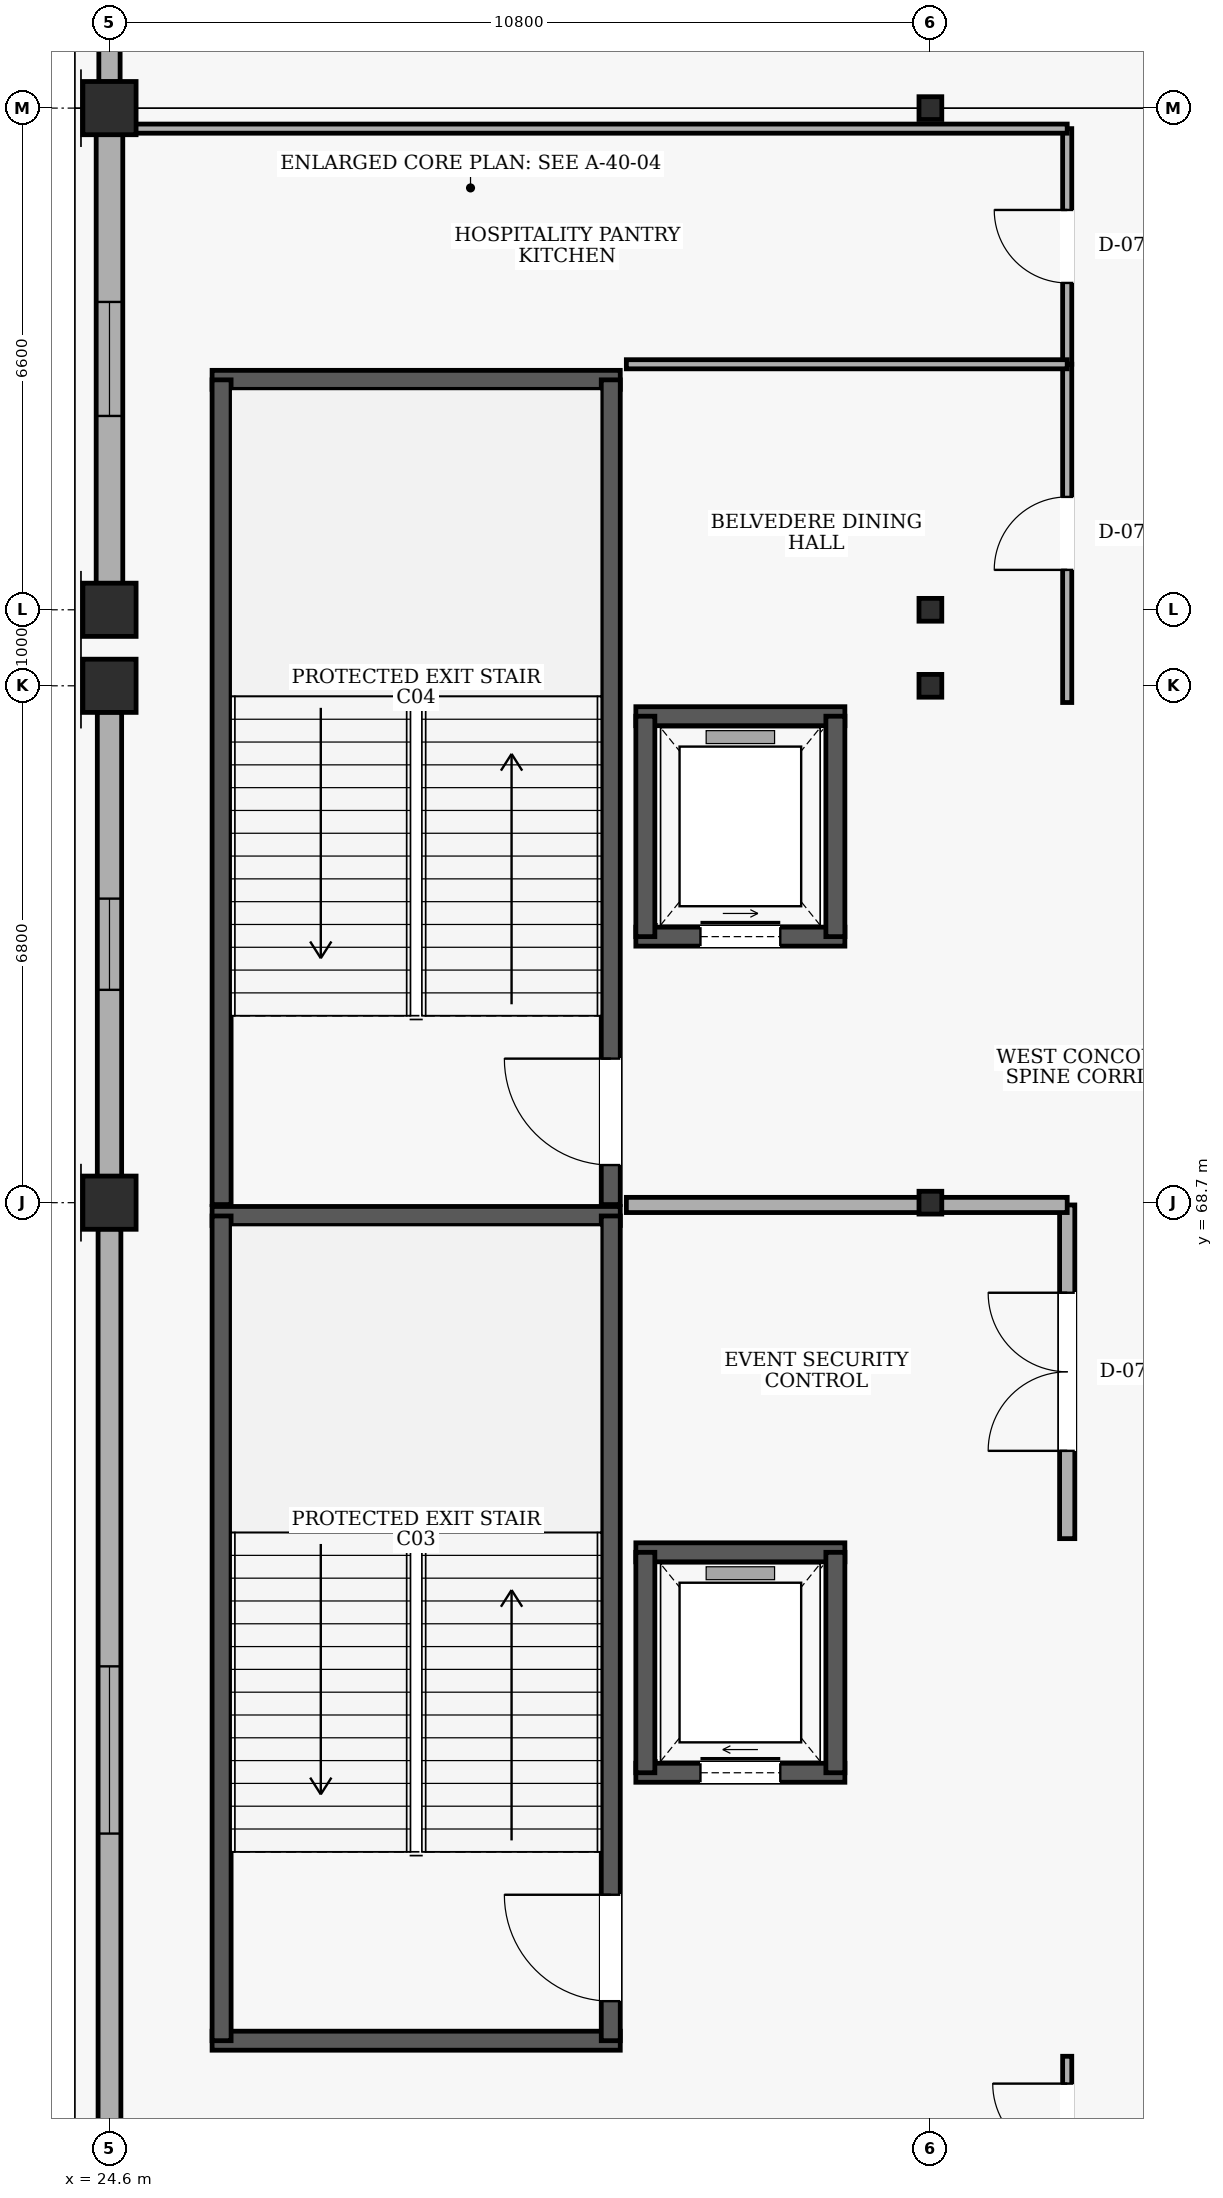
"""IFC4 building model, lengths in metres.
Left out: names, types, materials, properties, quantities, classifications, styles, units other than length and angle.
Written with IfcOpenShell. Run it as: python <this file> out.ifc"""

import sys

from ifc_helpers import new_model, si_unit, direction, frame, frame_2d, origin, origin_2d, place, context, subcontext, project, spatial, rectangle, hollow_rectangle, extrude, element, fill, save


model = new_model("IFC4")
c1 = context("Model", 3, precision=1e-05, world=origin(), true_north=direction((0.0, 1.0)))
c2 = subcontext(c1, "Body", "Model", "MODEL_VIEW")
j1 = project(units=[si_unit("LENGTHUNIT", "METRE"), si_unit("PLANEANGLEUNIT", "RADIAN")], contexts=[c1])
p1 = place(None, origin())
s1 = spatial("IfcSite", under=j1, at=p1, CompositionType="ELEMENT")
p2 = place(p1, origin())
s2 = spatial("IfcBuilding", under=s1, at=p2, CompositionType="ELEMENT")
p3 = place(p2, frame((0.0, 0.0, 24.6)))
s3 = spatial("IfcBuildingStorey", under=s2, at=p3, CompositionType="ELEMENT", Elevation=24.6)
for number, where, z_axis, x_axis in (
    (1, (24.6, 68.7, 0.0), (0.0, 0.0, 1.0), (1.0, 0.0, 0.0)),
    (2, (24.6, 75.5, 0.0), (0.0, 0.0, 1.0), (1.0, 0.0, 0.0)),
    (3, (24.6, 76.5, 0.0), (0.0, 0.0, 1.0), (1.0, 0.0, 0.0)),
    (4, (24.6, 83.1, 0.0), (0.0, 0.0, 1.0), (1.0, 0.0, 0.0)),
):
    element("IfcColumn", number, at=place(p3, frame(where, z_axis=z_axis, x_axis=x_axis)), inside=s3, PredefinedType="COLUMN", context=c2, shape_type="SweptSolid", body=[
        extrude(rectangle(XDim=0.7, YDim=0.7, at=origin_2d()), origin(), (0.0, 0.0, 1.0), 4.8),
    ])
for number, where, z_axis, x_axis in (
    (5, (35.4, 68.7, 0.0), (0.0, 0.0, 1.0), (1.0, 0.0, 0.0)),
    (6, (35.4, 75.5, 0.0), (0.0, 0.0, 1.0), (1.0, 0.0, 0.0)),
    (7, (35.4, 76.5, 0.0), (0.0, 0.0, 1.0), (1.0, 0.0, 0.0)),
    (8, (35.4, 83.1, 0.0), (0.0, 0.0, 1.0), (1.0, 0.0, 0.0)),
):
    element("IfcColumn", number, at=place(p3, frame(where, z_axis=z_axis, x_axis=x_axis)), inside=s3, PredefinedType="COLUMN", context=c2, shape_type="SweptSolid", body=[
        extrude(hollow_rectangle(XDim=0.3, YDim=0.3, WallThickness=0.016, at=origin_2d()), origin(), (0.0, 0.0, 1.0), 4.8),
    ])
p4 = place(p3, frame((24.6, 54.645, 0.0), z_axis=(0.0, 0.0, 1.0), x_axis=(0.0, 1.0, 0.0)))
e9 = element("IfcWall", 9, at=p4, inside=s3, PredefinedType="SOLIDWALL", context=c2, shape_type="SweptSolid", body=[
    extrude(rectangle(XDim=13.71, YDim=0.3, at=frame_2d((6.855, 0.0))), origin(), (0.0, 0.0, 1.0), 3.58),
])
p5 = place(p4, frame((5.755, 0.0, 0.9)))
e10 = element("IfcOpeningElement", 10, at=p5, cuts=e9, PredefinedType="OPENING", context=c2, shape_type="SweptSolid", body=[
    extrude(rectangle(XDim=2.2, YDim=1.5, at=frame_2d((1.1, 0.75))), frame((0.0, 0.16, 0.0), z_axis=(0.0, -1.0, 0.0), x_axis=(1.0, 0.0, 0.0)), (0.0, 0.0, 1.0), 0.32),
])
p6 = place(p3, frame((24.6, 69.045, 0.0), z_axis=(0.0, 0.0, 1.0), x_axis=(0.0, 1.0, 0.0)))
e11 = element("IfcWall", 11, at=p6, inside=s3, PredefinedType="SOLIDWALL", context=c2, shape_type="SweptSolid", body=[
    extrude(rectangle(XDim=6.11, YDim=0.32, at=frame_2d((3.055, 0.0))), origin(), (0.0, 0.0, 1.0), 3.88),
])
p7 = place(p6, frame((2.455, 0.0, 0.9)))
e12 = element("IfcOpeningElement", 12, at=p7, cuts=e11, PredefinedType="OPENING", context=c2, shape_type="SweptSolid", body=[
    extrude(rectangle(XDim=1.2, YDim=1.8, at=frame_2d((0.6, 0.9))), frame((0.0, 0.17, 0.0), z_axis=(0.0, -1.0, 0.0), x_axis=(1.0, 0.0, 0.0)), (0.0, 0.0, 1.0), 0.34),
])
p8 = place(p3, frame((24.6, 76.845, 0.0), z_axis=(0.0, 0.0, 1.0), x_axis=(0.0, 1.0, 0.0)))
e13 = element("IfcWall", 13, at=p8, inside=s3, PredefinedType="SOLIDWALL", context=c2, shape_type="SweptSolid", body=[
    extrude(rectangle(XDim=5.91, YDim=0.35, at=frame_2d((2.955, 0.0))), origin(), (0.0, 0.0, 1.0), 3.98),
])
p9 = place(p8, frame((2.205, 0.0, 0.9)))
e14 = element("IfcOpeningElement", 14, at=p9, cuts=e13, PredefinedType="OPENING", context=c2, shape_type="SweptSolid", body=[
    extrude(rectangle(XDim=1.5, YDim=1.8, at=frame_2d((0.75, 0.9))), frame((0.0, 0.185, 0.0), z_axis=(0.0, -1.0, 0.0), x_axis=(1.0, 0.0, 0.0)), (0.0, 0.0, 1.0), 0.37),
])
p10 = place(p3, frame((24.6, 83.445, 0.0), z_axis=(0.0, 0.0, 1.0), x_axis=(0.0, 1.0, 0.0)))
e15 = element("IfcWall", 15, at=p10, inside=s3, PredefinedType="SOLIDWALL", context=c2, shape_type="SweptSolid", body=[
    extrude(rectangle(XDim=13.71, YDim=0.28, at=frame_2d((6.855, 0.0))), origin(), (0.0, 0.0, 1.0), 3.58),
])
p11 = place(p10, frame((5.955, 0.0, 0.9)))
e16 = element("IfcOpeningElement", 16, at=p11, cuts=e15, PredefinedType="OPENING", context=c2, shape_type="SweptSolid", body=[
    extrude(rectangle(XDim=1.8, YDim=1.8, at=frame_2d((0.9, 0.9))), frame((0.0, 0.15, 0.0), z_axis=(0.0, -1.0, 0.0), x_axis=(1.0, 0.0, 0.0)), (0.0, 0.0, 1.0), 0.3),
])
for number, where, z_axis, x_axis in (
    (17, (25.95, 57.675, 0.0), (0.0, 0.0, 1.0), (1.0, 0.0, 0.0)),
    (18, (31.32, 68.525, 0.0), (0.0, 0.0, 1.0), (-1.0, 0.0, 0.0)),
):
    element("IfcWall", number, at=place(p3, frame(where, z_axis=z_axis, x_axis=x_axis)), inside=s3, PredefinedType="SHEAR", context=c2, shape_type="SweptSolid", body=[
        extrude(rectangle(XDim=5.37, YDim=0.25, at=frame_2d((2.685, 0.0))), origin(), (0.0, 0.0, 1.0), 4.5),
    ])
p12 = place(p3, frame((26.075, 57.675, 0.0), z_axis=(0.0, 0.0, 1.0), x_axis=(0.0, 1.0, 0.0)))
e19 = element("IfcWall", 19, at=p12, inside=s3, PredefinedType="SHEAR", context=c2, shape_type="SweptSolid", body=[
    extrude(rectangle(XDim=10.85, YDim=0.25, at=frame_2d((5.425, 0.0))), origin(), (0.0, 0.0, 1.0), 4.5),
])
p13 = place(p3, frame((31.195, 57.675, 0.0), z_axis=(0.0, 0.0, 1.0), x_axis=(0.0, 1.0, 0.0)))
e20 = element("IfcWall", 20, at=p13, inside=s3, PredefinedType="SHEAR", context=c2, shape_type="SweptSolid", body=[
    extrude(rectangle(XDim=10.85, YDim=0.25, at=frame_2d((5.425, 0.0))), origin(), (0.0, 0.0, 1.0), 4.5),
])
p14 = place(p13, frame((0.52, 0.0, 0.0)))
e21 = element("IfcOpeningElement", 21, at=p14, cuts=e20, PredefinedType="OPENING", context=c2, shape_type="SweptSolid", body=[
    extrude(rectangle(XDim=1.4, YDim=2.15, at=frame_2d((0.7, 1.075))), frame((0.0, 0.135, 0.0), z_axis=(0.0, -1.0, 0.0), x_axis=(1.0, 0.0, 0.0)), (0.0, 0.0, 1.0), 0.27),
])
p15 = place(p3, frame((31.32, 79.525, 0.0), z_axis=(0.0, 0.0, 1.0), x_axis=(-1.0, 0.0, 0.0)))
e22 = element("IfcWall", 22, at=p15, inside=s3, PredefinedType="SHEAR", context=c2, shape_type="SweptSolid", body=[
    extrude(rectangle(XDim=5.37, YDim=0.25, at=frame_2d((2.685, 0.0))), origin(), (0.0, 0.0, 1.0), 4.5),
])
p16 = place(p3, frame((26.075, 68.675, 0.0), z_axis=(0.0, 0.0, 1.0), x_axis=(0.0, 1.0, 0.0)))
e23 = element("IfcWall", 23, at=p16, inside=s3, PredefinedType="SHEAR", context=c2, shape_type="SweptSolid", body=[
    extrude(rectangle(XDim=10.85, YDim=0.25, at=frame_2d((5.425, 0.0))), origin(), (0.0, 0.0, 1.0), 4.5),
])
p17 = place(p3, frame((31.195, 68.675, 0.0), z_axis=(0.0, 0.0, 1.0), x_axis=(0.0, 1.0, 0.0)))
e24 = element("IfcWall", 24, at=p17, inside=s3, PredefinedType="SHEAR", context=c2, shape_type="SweptSolid", body=[
    extrude(rectangle(XDim=10.85, YDim=0.25, at=frame_2d((5.425, 0.0))), origin(), (0.0, 0.0, 1.0), 4.5),
])
p18 = place(p17, frame((0.52, 0.0, 0.0)))
e25 = element("IfcOpeningElement", 25, at=p18, cuts=e24, PredefinedType="OPENING", context=c2, shape_type="SweptSolid", body=[
    extrude(rectangle(XDim=1.4, YDim=2.15, at=frame_2d((0.7, 1.075))), frame((0.0, 0.135, 0.0), z_axis=(0.0, -1.0, 0.0), x_axis=(1.0, 0.0, 0.0)), (0.0, 0.0, 1.0), 0.27),
])
p19 = place(p3, frame((31.525, 61.2, 0.0), z_axis=(0.0, 0.0, 1.0), x_axis=(1.0, 0.0, 0.0)))
e26 = element("IfcWall", 26, at=p19, inside=s3, PredefinedType="SHEAR", context=c2, shape_type="SweptSolid", body=[
    extrude(rectangle(XDim=2.75, YDim=0.25, at=frame_2d((1.375, 0.0))), origin(), (0.0, 0.0, 1.0), 4.5),
])
p20 = place(p19, frame((0.85, 0.0, 0.0)))
e27 = element("IfcOpeningElement", 27, at=p20, cuts=e26, PredefinedType="OPENING", context=c2, shape_type="SweptSolid", body=[
    extrude(rectangle(XDim=1.05, YDim=2.15, at=frame_2d((0.525, 1.075))), frame((0.0, 0.135, 0.0), z_axis=(0.0, -1.0, 0.0), x_axis=(1.0, 0.0, 0.0)), (0.0, 0.0, 1.0), 0.27),
])
p21 = place(p3, frame((34.275, 64.1, 0.0), z_axis=(0.0, 0.0, 1.0), x_axis=(-1.0, 0.0, 0.0)))
e28 = element("IfcWall", 28, at=p21, inside=s3, PredefinedType="SHEAR", context=c2, shape_type="SweptSolid", body=[
    extrude(rectangle(XDim=2.75, YDim=0.25, at=frame_2d((1.375, 0.0))), origin(), (0.0, 0.0, 1.0), 4.5),
])
for number, where, z_axis, x_axis in (
    (29, (31.65, 64.1, 0.0), (0.0, 0.0, 1.0), (0.0, -1.0, 0.0)),
    (30, (34.15, 61.2, 0.0), (0.0, 0.0, 1.0), (0.0, 1.0, 0.0)),
):
    element("IfcWall", number, at=place(p3, frame(where, z_axis=z_axis, x_axis=x_axis)), inside=s3, PredefinedType="SHEAR", context=c2, shape_type="SweptSolid", body=[
        extrude(rectangle(XDim=2.9, YDim=0.25, at=frame_2d((1.45, 0.0))), origin(), (0.0, 0.0, 1.0), 4.5),
    ])
p22 = place(p3, frame((31.525, 72.2, 0.0), z_axis=(0.0, 0.0, 1.0), x_axis=(1.0, 0.0, 0.0)))
e31 = element("IfcWall", 31, at=p22, inside=s3, PredefinedType="SHEAR", context=c2, shape_type="SweptSolid", body=[
    extrude(rectangle(XDim=2.75, YDim=0.25, at=frame_2d((1.375, 0.0))), origin(), (0.0, 0.0, 1.0), 4.5),
])
p23 = place(p22, frame((0.85, 0.0, 0.0)))
e32 = element("IfcOpeningElement", 32, at=p23, cuts=e31, PredefinedType="OPENING", context=c2, shape_type="SweptSolid", body=[
    extrude(rectangle(XDim=1.05, YDim=2.15, at=frame_2d((0.525, 1.075))), frame((0.0, 0.135, 0.0), z_axis=(0.0, -1.0, 0.0), x_axis=(1.0, 0.0, 0.0)), (0.0, 0.0, 1.0), 0.27),
])
p24 = place(p3, frame((34.275, 75.1, 0.0), z_axis=(0.0, 0.0, 1.0), x_axis=(-1.0, 0.0, 0.0)))
e33 = element("IfcWall", 33, at=p24, inside=s3, PredefinedType="SHEAR", context=c2, shape_type="SweptSolid", body=[
    extrude(rectangle(XDim=2.75, YDim=0.25, at=frame_2d((1.375, 0.0))), origin(), (0.0, 0.0, 1.0), 4.5),
])
for number, where, z_axis, x_axis in (
    (34, (31.65, 75.1, 0.0), (0.0, 0.0, 1.0), (0.0, -1.0, 0.0)),
    (35, (34.15, 72.2, 0.0), (0.0, 0.0, 1.0), (0.0, 1.0, 0.0)),
):
    element("IfcWall", number, at=place(p3, frame(where, z_axis=z_axis, x_axis=x_axis)), inside=s3, PredefinedType="SHEAR", context=c2, shape_type="SweptSolid", body=[
        extrude(rectangle(XDim=2.9, YDim=0.25, at=frame_2d((1.45, 0.0))), origin(), (0.0, 0.0, 1.0), 4.5),
    ])
p25 = place(p3, frame((37.2, 54.57, 0.0), z_axis=(0.0, 0.0, 1.0), x_axis=(0.0, 1.0, 0.0)))
e36 = element("IfcWall", 36, at=p25, inside=s3, PredefinedType="PARTITIONING", context=c2, shape_type="SweptSolid", body=[
    extrude(rectangle(XDim=2.9, YDim=0.12, at=frame_2d((1.45, 0.0))), origin(), (0.0, 0.0, 1.0), 4.5),
])
p26 = place(p25, frame((0.58, 0.0, 0.0)))
e37 = element("IfcOpeningElement", 37, at=p26, cuts=e36, PredefinedType="OPENING", context=c2, shape_type="SweptSolid", body=[
    extrude(rectangle(XDim=1.96, YDim=2.3, at=frame_2d((0.98, 1.15))), frame((0.0, 0.07, 0.0), z_axis=(0.0, -1.0, 0.0), x_axis=(1.0, 0.0, 0.0)), (0.0, 0.0, 1.0), 0.14),
])
p27 = place(p3, frame((37.2, 64.28, 0.0), z_axis=(0.0, 0.0, 1.0), x_axis=(0.0, 1.0, 0.0)))
e38 = element("IfcWall", 38, at=p27, inside=s3, PredefinedType="PARTITIONING", context=c2, shape_type="SweptSolid", body=[
    extrude(rectangle(XDim=4.39, YDim=0.2, at=frame_2d((2.195, 0.0))), origin(), (0.0, 0.0, 1.0), 4.5),
])
p28 = place(p27, frame((1.155, 0.0, 0.0)))
e39 = element("IfcOpeningElement", 39, at=p28, cuts=e38, PredefinedType="OPENING", context=c2, shape_type="SweptSolid", body=[
    extrude(rectangle(XDim=2.08, YDim=2.35, at=frame_2d((1.04, 1.175))), frame((0.0, 0.11, 0.0), z_axis=(0.0, -1.0, 0.0), x_axis=(1.0, 0.0, 0.0)), (0.0, 0.0, 1.0), 0.22),
])
p29 = place(p3, frame((37.2, 68.67, 0.0), z_axis=(0.0, 0.0, 1.0), x_axis=(-1.0, 0.0, 0.0)))
e40 = element("IfcWall", 40, at=p29, inside=s3, PredefinedType="PARTITIONING", context=c2, shape_type="SweptSolid", body=[
    extrude(rectangle(XDim=5.8, YDim=0.2, at=frame_2d((2.9, 0.0))), origin(), (0.0, 0.0, 1.0), 3.78),
])
p30 = place(p3, frame((37.2, 79.73, 0.0), z_axis=(0.0, 0.0, 1.0), x_axis=(0.0, 1.0, 0.0)))
e41 = element("IfcWall", 41, at=p30, inside=s3, PredefinedType="PARTITIONING", context=c2, shape_type="SweptSolid", body=[
    extrude(rectangle(XDim=3.1, YDim=0.12, at=frame_2d((1.55, 0.0))), origin(), (0.0, 0.0, 1.0), 4.5),
])
p31 = place(p30, frame((1.07, 0.0, 0.0)))
e42 = element("IfcOpeningElement", 42, at=p31, cuts=e41, PredefinedType="OPENING", context=c2, shape_type="SweptSolid", body=[
    extrude(rectangle(XDim=0.96, YDim=2.1, at=frame_2d((0.48, 1.05))), frame((0.0, 0.07, 0.0), z_axis=(0.0, -1.0, 0.0), x_axis=(1.0, 0.0, 0.0)), (0.0, 0.0, 1.0), 0.14),
])
p32 = place(p3, frame((37.2, 82.83, 0.0), z_axis=(0.0, 0.0, 1.0), x_axis=(-1.0, 0.0, 0.0)))
e43 = element("IfcWall", 43, at=p32, inside=s3, PredefinedType="PARTITIONING", context=c2, shape_type="SweptSolid", body=[
    extrude(rectangle(XDim=12.355, YDim=0.12, at=frame_2d((6.177, 0.0))), origin(), (0.0, 0.0, 1.0), 3.78),
])
p33 = place(p3, frame((37.2, 75.28, 0.0), z_axis=(0.0, 0.0, 1.0), x_axis=(0.0, 1.0, 0.0)))
e44 = element("IfcWall", 44, at=p33, inside=s3, PredefinedType="PARTITIONING", context=c2, shape_type="SweptSolid", body=[
    extrude(rectangle(XDim=4.45, YDim=0.12, at=frame_2d((2.225, 0.0))), origin(), (0.0, 0.0, 1.0), 4.5),
])
p34 = place(p33, frame((1.745, 0.0, 0.0)))
e45 = element("IfcOpeningElement", 45, at=p34, cuts=e44, PredefinedType="OPENING", context=c2, shape_type="SweptSolid", body=[
    extrude(rectangle(XDim=0.96, YDim=2.1, at=frame_2d((0.48, 1.05))), frame((0.0, 0.07, 0.0), z_axis=(0.0, -1.0, 0.0), x_axis=(1.0, 0.0, 0.0)), (0.0, 0.0, 1.0), 0.14),
])
p35 = place(p3, frame((37.2, 79.73, 0.0), z_axis=(0.0, 0.0, 1.0), x_axis=(-1.0, 0.0, 0.0)))
e46 = element("IfcWall", 46, at=p35, inside=s3, PredefinedType="PARTITIONING", context=c2, shape_type="SweptSolid", body=[
    extrude(rectangle(XDim=5.8, YDim=0.12, at=frame_2d((2.9, 0.0))), origin(), (0.0, 0.0, 1.0), 4.5),
])
p36 = place(p5, origin())
e47 = element("IfcWindow", 47, at=p36, inside=s3, PartitioningType="SINGLE_PANEL", PredefinedType="WINDOW", context=c2, shape_type="SweptSolid", body=[
    extrude(rectangle(XDim=2.2, YDim=1.5, at=frame_2d((1.1, 0.75))), frame((0.0, 0.03, 0.0), z_axis=(0.0, -1.0, 0.0), x_axis=(1.0, 0.0, 0.0)), (0.0, 0.0, 1.0), 0.06),
])
fill(e10, e47)
p37 = place(p7, origin())
e48 = element("IfcWindow", 48, at=p37, inside=s3, PartitioningType="SINGLE_PANEL", PredefinedType="WINDOW", context=c2, shape_type="SweptSolid", body=[
    extrude(rectangle(XDim=1.2, YDim=1.8, at=frame_2d((0.6, 0.9))), frame((0.0, 0.03, 0.0), z_axis=(0.0, -1.0, 0.0), x_axis=(1.0, 0.0, 0.0)), (0.0, 0.0, 1.0), 0.06),
])
fill(e12, e48)
p38 = place(p9, origin())
e49 = element("IfcWindow", 49, at=p38, inside=s3, PartitioningType="SINGLE_PANEL", PredefinedType="WINDOW", context=c2, shape_type="SweptSolid", body=[
    extrude(rectangle(XDim=1.5, YDim=1.8, at=frame_2d((0.75, 0.9))), frame((0.0, 0.03, 0.0), z_axis=(0.0, -1.0, 0.0), x_axis=(1.0, 0.0, 0.0)), (0.0, 0.0, 1.0), 0.06),
])
fill(e14, e49)
p39 = place(p14, origin())
e50 = element("IfcDoor", 50, at=p39, inside=s3, OperationType="SINGLE_SWING_RIGHT", PredefinedType="DOOR", context=c2, shape_type="SweptSolid", body=[
    extrude(rectangle(XDim=1.4, YDim=2.15, at=frame_2d((0.7, 1.075))), frame((0.0, 0.025, 0.0), z_axis=(0.0, -1.0, 0.0), x_axis=(1.0, 0.0, 0.0)), (0.0, 0.0, 1.0), 0.05),
])
fill(e21, e50)
p40 = place(p18, origin())
e51 = element("IfcDoor", 51, at=p40, inside=s3, OperationType="SINGLE_SWING_RIGHT", PredefinedType="DOOR", context=c2, shape_type="SweptSolid", body=[
    extrude(rectangle(XDim=1.4, YDim=2.15, at=frame_2d((0.7, 1.075))), frame((0.0, 0.025, 0.0), z_axis=(0.0, -1.0, 0.0), x_axis=(1.0, 0.0, 0.0)), (0.0, 0.0, 1.0), 0.05),
])
fill(e25, e51)
p41 = place(p20, origin())
e52 = element("IfcDoor", 52, at=p41, inside=s3, OperationType="SLIDING_TO_RIGHT", PredefinedType="DOOR", context=c2, shape_type="SweptSolid", body=[
    extrude(rectangle(XDim=1.05, YDim=2.15, at=frame_2d((0.525, 1.075))), frame((0.0, 0.025, 0.0), z_axis=(0.0, -1.0, 0.0), x_axis=(1.0, 0.0, 0.0)), (0.0, 0.0, 1.0), 0.05),
])
fill(e27, e52)
p42 = place(p23, origin())
e53 = element("IfcDoor", 53, at=p42, inside=s3, OperationType="SLIDING_TO_LEFT", PredefinedType="DOOR", context=c2, shape_type="SweptSolid", body=[
    extrude(rectangle(XDim=1.05, YDim=2.15, at=frame_2d((0.525, 1.075))), frame((0.0, 0.025, 0.0), z_axis=(0.0, -1.0, 0.0), x_axis=(1.0, 0.0, 0.0)), (0.0, 0.0, 1.0), 0.05),
])
fill(e32, e53)
p43 = place(p26, origin())
e54 = element("IfcDoor", 54, at=p43, inside=s3, OperationType="DOUBLE_DOOR_SINGLE_SWING", PredefinedType="DOOR", context=c2, shape_type="SweptSolid", body=[
    extrude(rectangle(XDim=1.96, YDim=2.3, at=frame_2d((0.98, 1.15))), frame((0.0, 0.025, 0.0), z_axis=(0.0, -1.0, 0.0), x_axis=(1.0, 0.0, 0.0)), (0.0, 0.0, 1.0), 0.05),
])
fill(e37, e54)
p44 = place(p28, origin())
e55 = element("IfcDoor", 55, at=p44, inside=s3, OperationType="DOUBLE_DOOR_SINGLE_SWING", PredefinedType="DOOR", context=c2, shape_type="SweptSolid", body=[
    extrude(rectangle(XDim=2.08, YDim=2.35, at=frame_2d((1.04, 1.175))), frame((0.0, 0.025, 0.0), z_axis=(0.0, -1.0, 0.0), x_axis=(1.0, 0.0, 0.0)), (0.0, 0.0, 1.0), 0.05),
])
fill(e39, e55)
p45 = place(p31, origin())
e56 = element("IfcDoor", 56, at=p45, inside=s3, OperationType="SINGLE_SWING_RIGHT", PredefinedType="DOOR", context=c2, shape_type="SweptSolid", body=[
    extrude(rectangle(XDim=0.96, YDim=2.1, at=frame_2d((0.48, 1.05))), frame((0.0, 0.025, 0.0), z_axis=(0.0, -1.0, 0.0), x_axis=(1.0, 0.0, 0.0)), (0.0, 0.0, 1.0), 0.05),
])
fill(e42, e56)
p46 = place(p34, origin())
e57 = element("IfcDoor", 57, at=p46, inside=s3, OperationType="SINGLE_SWING_LEFT", PredefinedType="DOOR", context=c2, shape_type="SweptSolid", body=[
    extrude(rectangle(XDim=0.96, YDim=2.1, at=frame_2d((0.48, 1.05))), frame((0.0, 0.025, 0.0), z_axis=(0.0, -1.0, 0.0), x_axis=(1.0, 0.0, 0.0)), (0.0, 0.0, 1.0), 0.05),
])
fill(e45, e57)
save(model, sys.argv[1])
